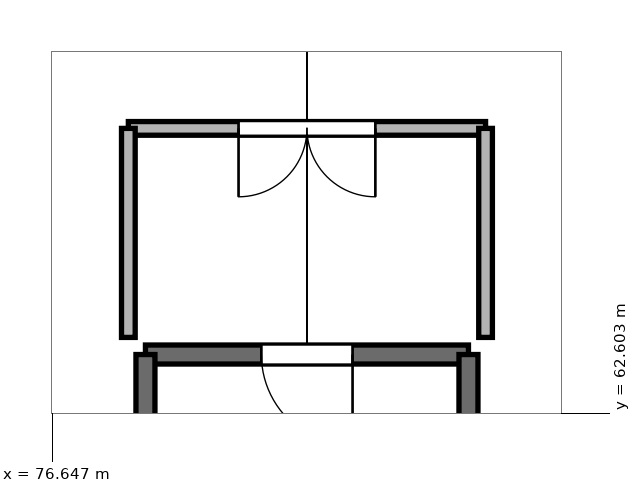
"""IFC4 building model, lengths in metres.
Left out: names, types, materials, properties, quantities, classifications, styles, units other than length and angle.
Written with IfcOpenShell. Run it as: python <this file> out.ifc"""

import sys

from ifc_helpers import new_model, si_unit, direction, frame, frame_2d, origin, place, context, subcontext, project, spatial, rectangle, extrude, element, fill, save


model = new_model("IFC4")
c1 = context("Model", 3, precision=1e-05, world=origin(), true_north=direction((0.0, 1.0)))
c2 = subcontext(c1, "Body", "Model", "MODEL_VIEW")
j1 = project(units=[si_unit("LENGTHUNIT", "METRE"), si_unit("PLANEANGLEUNIT", "RADIAN")], contexts=[c1])
p1 = place(None, origin())
s1 = spatial("IfcSite", under=j1, at=p1, CompositionType="ELEMENT")
p2 = place(p1, origin())
s2 = spatial("IfcBuilding", under=s1, at=p2, CompositionType="ELEMENT")
p3 = place(p2, frame((0.0, 0.0, 47.05)))
s3 = spatial("IfcBuildingStorey", under=s2, at=p3, CompositionType="ELEMENT", Elevation=47.05)
p4 = place(p3, frame((82.125, 63.375, 0.0), z_axis=(0.0, 0.0, 1.0), x_axis=(-1.0, 0.0, 0.0)))
e1 = element("IfcWall", 1, at=p4, inside=s3, PredefinedType="SHEAR", context=c2, shape_type="SweptSolid", body=[
    extrude(rectangle(XDim=4.25, YDim=0.25, at=frame_2d((2.125, 0.0))), origin(), (0.0, 0.0, 1.0), 3.02),
])
p5 = place(p4, frame((1.525, 0.0, 0.0)))
e2 = element("IfcOpeningElement", 2, at=p5, cuts=e1, PredefinedType="OPENING", context=c2, shape_type="SweptSolid", body=[
    extrude(rectangle(XDim=1.2, YDim=2.2, at=frame_2d((0.6, 1.1))), frame((0.0, 0.137, 0.0), z_axis=(0.0, -1.0, 0.0), x_axis=(1.0, 0.0, 0.0)), (0.0, 0.0, 1.0), 0.274),
])
for number, where, z_axis, x_axis in (
    (3, (77.875, 63.375, 0.0), (0.0, 0.0, 1.0), (0.0, -1.0, 0.0)),
    (4, (82.125, 56.175, 0.0), (0.0, 0.0, 1.0), (0.0, 1.0, 0.0)),
):
    element("IfcWall", number, at=place(p3, frame(where, z_axis=z_axis, x_axis=x_axis)), inside=s3, PredefinedType="SHEAR", context=c2, shape_type="SweptSolid", body=[
        extrude(rectangle(XDim=7.2, YDim=0.25, at=frame_2d((3.6, 0.0))), origin(), (0.0, 0.0, 1.0), 3.02),
    ])
p6 = place(p3, frame((77.65, 66.35, 0.0), z_axis=(0.0, 0.0, 1.0), x_axis=(1.0, 0.0, 0.0)))
e5 = element("IfcWall", 5, at=p6, inside=s3, PredefinedType="PARTITIONING", context=c2, shape_type="SweptSolid", body=[
    extrude(rectangle(XDim=4.7, YDim=0.18, at=frame_2d((2.35, 0.0))), origin(), (0.0, 0.0, 1.0), 2.53),
])
p7 = place(p6, frame((1.45, 0.0, 0.0)))
e6 = element("IfcOpeningElement", 6, at=p7, cuts=e5, PredefinedType="OPENING", context=c2, shape_type="SweptSolid", body=[
    extrude(rectangle(XDim=1.8, YDim=2.2, at=frame_2d((0.9, 1.1))), frame((0.0, 0.102, 0.0), z_axis=(0.0, -1.0, 0.0), x_axis=(1.0, 0.0, 0.0)), (0.0, 0.0, 1.0), 0.204),
])
for number, where, z_axis, x_axis in (
    (7, (77.65, 63.6, 0.0), (0.0, 0.0, 1.0), (0.0, 1.0, 0.0)),
    (8, (82.35, 63.6, 0.0), (0.0, 0.0, 1.0), (0.0, 1.0, 0.0)),
):
    element("IfcWall", number, at=place(p3, frame(where, z_axis=z_axis, x_axis=x_axis)), inside=s3, PredefinedType="PARTITIONING", context=c2, shape_type="SweptSolid", body=[
        extrude(rectangle(XDim=2.75, YDim=0.18, at=frame_2d((1.375, 0.0))), origin(), (0.0, 0.0, 1.0), 2.53),
    ])
p8 = place(p5, origin())
e9 = element("IfcDoor", 9, at=p8, inside=s3, OperationType="SINGLE_SWING_LEFT", PredefinedType="DOOR", context=c2, shape_type="SweptSolid", body=[
    extrude(rectangle(XDim=1.2, YDim=2.2, at=frame_2d((0.6, 1.1))), frame((0.0, 0.025, 0.0), z_axis=(0.0, -1.0, 0.0), x_axis=(1.0, 0.0, 0.0)), (0.0, 0.0, 1.0), 0.05),
])
fill(e2, e9)
p9 = place(p7, frame((1.8, 0.0, 0.0), z_axis=(0.0, 0.0, 1.0), x_axis=(-1.0, 0.0, 0.0)))
e10 = element("IfcDoor", 10, at=p9, inside=s3, OperationType="DOUBLE_DOOR_SINGLE_SWING", PredefinedType="DOOR", context=c2, shape_type="SweptSolid", body=[
    extrude(rectangle(XDim=1.8, YDim=2.2, at=frame_2d((0.9, 1.1))), frame((0.0, 0.025, 0.0), z_axis=(0.0, -1.0, 0.0), x_axis=(1.0, 0.0, 0.0)), (0.0, 0.0, 1.0), 0.05),
])
fill(e6, e10)
save(model, sys.argv[1])
